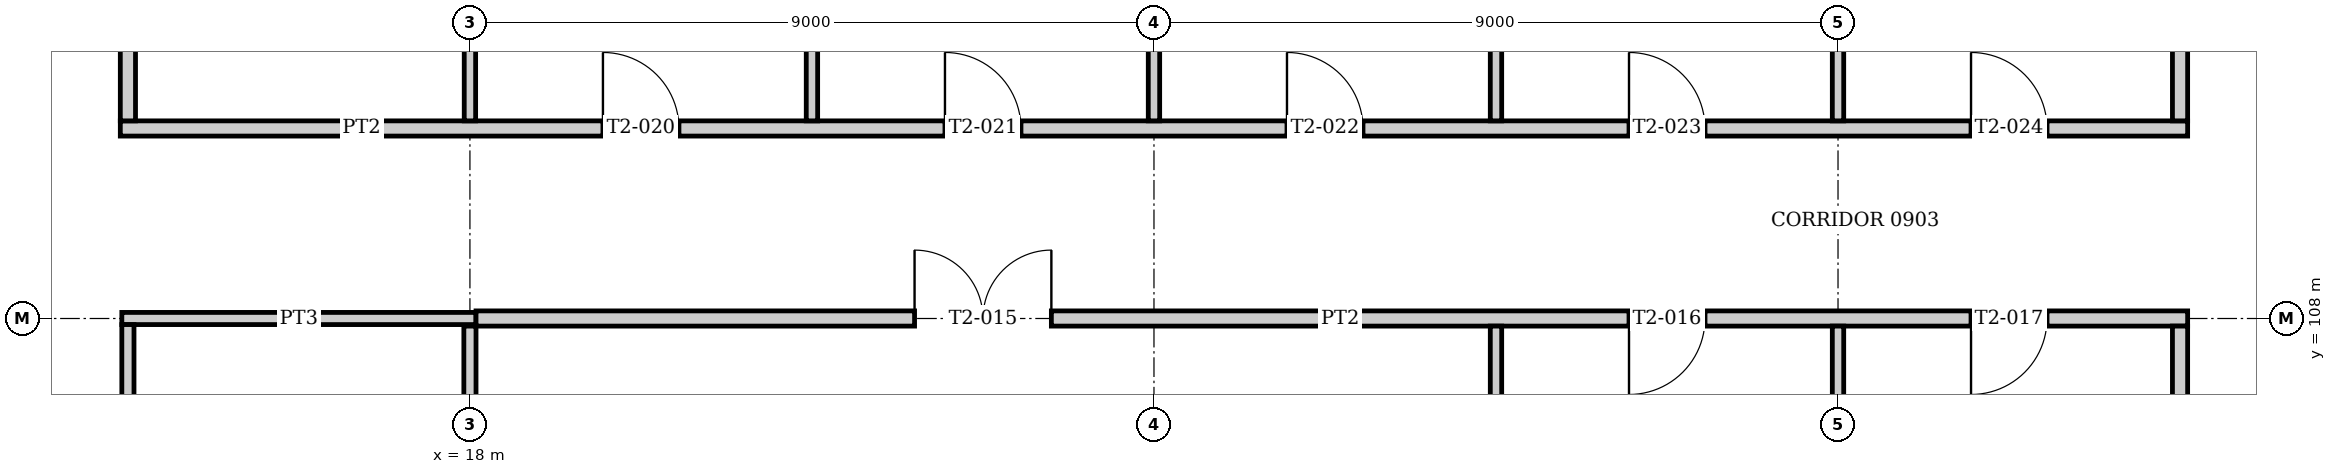
"""IFC4 building model, lengths in metres.
Left out: names, types, materials, properties, quantities, classifications, styles, units other than length and angle.
Written with IfcOpenShell. Run it as: python <this file> out.ifc"""

import sys

from ifc_helpers import new_model, si_unit, direction, frame, frame_2d, origin, place, context, subcontext, project, spatial, rectangle, extrude, element, fill, save


model = new_model("IFC4")
c1 = context("Model", 3, precision=1e-05, world=origin(), true_north=direction((0.0, 1.0)))
c2 = subcontext(c1, "Body", "Model", "MODEL_VIEW")
j1 = project(units=[si_unit("LENGTHUNIT", "METRE"), si_unit("PLANEANGLEUNIT", "RADIAN")], contexts=[c1])
p1 = place(None, origin())
s1 = spatial("IfcSite", under=j1, at=p1, CompositionType="ELEMENT")
p2 = place(p1, origin())
s2 = spatial("IfcBuilding", under=s1, at=p2, CompositionType="ELEMENT")
p3 = place(p2, frame((0.0, 0.0, 39.2)))
s3 = spatial("IfcBuildingStorey", under=s2, at=p3, CompositionType="ELEMENT", Elevation=39.2)
p4 = place(p3, frame((13.42, 108.0, 0.0), z_axis=(0.0, 0.0, 1.0), x_axis=(1.0, 0.0, 0.0)))
e1 = element("IfcWall", 1, at=p4, inside=s3, PredefinedType="PARTITIONING", context=c2, shape_type="SweptSolid", body=[
    extrude(rectangle(XDim=4.66, YDim=0.16, at=frame_2d((2.33, 0.0))), origin(), (0.0, 0.0, 1.0), 3.05),
])
p5 = place(p3, frame((18.08, 108.0, 0.0), z_axis=(0.0, 0.0, 1.0), x_axis=(1.0, 0.0, 0.0)))
e2 = element("IfcWall", 2, at=p5, inside=s3, PredefinedType="PARTITIONING", context=c2, shape_type="SweptSolid", body=[
    extrude(rectangle(XDim=22.52, YDim=0.2, at=frame_2d((11.26, 0.0))), origin(), (0.0, 0.0, 1.0), 3.05),
])
p6 = place(p5, frame((5.77, 0.0, 0.0)))
e3 = element("IfcOpeningElement", 3, at=p6, cuts=e2, PredefinedType="OPENING", context=c2, shape_type="SweptSolid", body=[
    extrude(rectangle(XDim=1.8, YDim=2.1, at=frame_2d((0.9, 1.05))), frame((0.0, 0.11, 0.0), z_axis=(0.0, -1.0, 0.0), x_axis=(1.0, 0.0, 0.0)), (0.0, 0.0, 1.0), 0.22),
])
p7 = place(p5, frame((15.17, 0.0, 0.0)))
e4 = element("IfcOpeningElement", 4, at=p7, cuts=e2, PredefinedType="OPENING", context=c2, shape_type="SweptSolid", body=[
    extrude(rectangle(XDim=1.0, YDim=2.1, at=frame_2d((0.5, 1.05))), frame((0.0, 0.11, 0.0), z_axis=(0.0, -1.0, 0.0), x_axis=(1.0, 0.0, 0.0)), (0.0, 0.0, 1.0), 0.22),
])
p8 = place(p5, frame((19.67, 0.0, 0.0)))
e5 = element("IfcOpeningElement", 5, at=p8, cuts=e2, PredefinedType="OPENING", context=c2, shape_type="SweptSolid", body=[
    extrude(rectangle(XDim=1.0, YDim=2.1, at=frame_2d((0.5, 1.05))), frame((0.0, 0.11, 0.0), z_axis=(0.0, -1.0, 0.0), x_axis=(1.0, 0.0, 0.0)), (0.0, 0.0, 1.0), 0.22),
])
p9 = place(p3, frame((13.4, 110.5, 0.0), z_axis=(0.0, 0.0, 1.0), x_axis=(1.0, 0.0, 0.0)))
e6 = element("IfcWall", 6, at=p9, inside=s3, PredefinedType="PARTITIONING", context=c2, shape_type="SweptSolid", body=[
    extrude(rectangle(XDim=27.2, YDim=0.2, at=frame_2d((13.6, 0.0))), origin(), (0.0, 0.0, 1.0), 3.05),
])
p10 = place(p9, frame((6.35, 0.0, 0.0)))
e7 = element("IfcOpeningElement", 7, at=p10, cuts=e6, PredefinedType="OPENING", context=c2, shape_type="SweptSolid", body=[
    extrude(rectangle(XDim=1.0, YDim=2.1, at=frame_2d((0.5, 1.05))), frame((0.0, 0.11, 0.0), z_axis=(0.0, -1.0, 0.0), x_axis=(1.0, 0.0, 0.0)), (0.0, 0.0, 1.0), 0.22),
])
p11 = place(p9, frame((10.85, 0.0, 0.0)))
e8 = element("IfcOpeningElement", 8, at=p11, cuts=e6, PredefinedType="OPENING", context=c2, shape_type="SweptSolid", body=[
    extrude(rectangle(XDim=1.0, YDim=2.1, at=frame_2d((0.5, 1.05))), frame((0.0, 0.11, 0.0), z_axis=(0.0, -1.0, 0.0), x_axis=(1.0, 0.0, 0.0)), (0.0, 0.0, 1.0), 0.22),
])
p12 = place(p9, frame((15.35, 0.0, 0.0)))
e9 = element("IfcOpeningElement", 9, at=p12, cuts=e6, PredefinedType="OPENING", context=c2, shape_type="SweptSolid", body=[
    extrude(rectangle(XDim=1.0, YDim=2.1, at=frame_2d((0.5, 1.05))), frame((0.0, 0.11, 0.0), z_axis=(0.0, -1.0, 0.0), x_axis=(1.0, 0.0, 0.0)), (0.0, 0.0, 1.0), 0.22),
])
p13 = place(p9, frame((19.85, 0.0, 0.0)))
e10 = element("IfcOpeningElement", 10, at=p13, cuts=e6, PredefinedType="OPENING", context=c2, shape_type="SweptSolid", body=[
    extrude(rectangle(XDim=1.0, YDim=2.1, at=frame_2d((0.5, 1.05))), frame((0.0, 0.11, 0.0), z_axis=(0.0, -1.0, 0.0), x_axis=(1.0, 0.0, 0.0)), (0.0, 0.0, 1.0), 0.22),
])
p14 = place(p9, frame((24.35, 0.0, 0.0)))
e11 = element("IfcOpeningElement", 11, at=p14, cuts=e6, PredefinedType="OPENING", context=c2, shape_type="SweptSolid", body=[
    extrude(rectangle(XDim=1.0, YDim=2.1, at=frame_2d((0.5, 1.05))), frame((0.0, 0.11, 0.0), z_axis=(0.0, -1.0, 0.0), x_axis=(1.0, 0.0, 0.0)), (0.0, 0.0, 1.0), 0.22),
])
p15 = place(p3, frame((13.5, 103.58, 0.0), z_axis=(0.0, 0.0, 1.0), x_axis=(0.0, 1.0, 0.0)))
e12 = element("IfcWall", 12, at=p15, inside=s3, PredefinedType="PARTITIONING", context=c2, shape_type="SweptSolid", body=[
    extrude(rectangle(XDim=4.34, YDim=0.16, at=frame_2d((2.17, 0.0))), origin(), (0.0, 0.0, 1.0), 3.05),
])
p16 = place(p15, frame((1.795, 0.0, 0.0)))
e13 = element("IfcOpeningElement", 13, at=p16, cuts=e12, PredefinedType="OPENING", context=c2, shape_type="SweptSolid", body=[
    extrude(rectangle(XDim=0.75, YDim=2.1, at=frame_2d((0.375, 1.05))), frame((0.0, 0.09, 0.0), z_axis=(0.0, -1.0, 0.0), x_axis=(1.0, 0.0, 0.0)), (0.0, 0.0, 1.0), 0.18),
])
p17 = place(p3, frame((13.5, 110.6, 0.0), z_axis=(0.0, 0.0, 1.0), x_axis=(0.0, 1.0, 0.0)))
e14 = element("IfcWall", 14, at=p17, inside=s3, PredefinedType="PARTITIONING", context=c2, shape_type="SweptSolid", body=[
    extrude(rectangle(XDim=6.31, YDim=0.2, at=frame_2d((3.155, 0.0))), origin(), (0.0, 0.0, 1.0), 3.05),
])
p18 = place(p17, frame((1.25, 0.0, 0.0)))
e15 = element("IfcOpeningElement", 15, at=p18, cuts=e14, PredefinedType="OPENING", context=c2, shape_type="SweptSolid", body=[
    extrude(rectangle(XDim=0.8, YDim=2.1, at=frame_2d((0.4, 1.05))), frame((0.0, 0.11, 0.0), z_axis=(0.0, -1.0, 0.0), x_axis=(1.0, 0.0, 0.0)), (0.0, 0.0, 1.0), 0.22),
])
p19 = place(p17, frame((4.44, 0.0, 0.0)))
e16 = element("IfcOpeningElement", 16, at=p19, cuts=e14, PredefinedType="OPENING", context=c2, shape_type="SweptSolid", body=[
    extrude(rectangle(XDim=0.92, YDim=2.1, at=frame_2d((0.46, 1.05))), frame((0.0, 0.11, 0.0), z_axis=(0.0, -1.0, 0.0), x_axis=(1.0, 0.0, 0.0)), (0.0, 0.0, 1.0), 0.22),
])
p20 = place(p3, frame((18.0, 103.58, 0.0), z_axis=(0.0, 0.0, 1.0), x_axis=(0.0, 1.0, 0.0)))
e17 = element("IfcWall", 17, at=p20, inside=s3, PredefinedType="PARTITIONING", context=c2, shape_type="SweptSolid", body=[
    extrude(rectangle(XDim=4.32, YDim=0.16, at=frame_2d((2.16, 0.0))), origin(), (0.0, 0.0, 1.0), 3.05),
])
p21 = place(p3, frame((18.0, 110.6, 0.0), z_axis=(0.0, 0.0, 1.0), x_axis=(0.0, 1.0, 0.0)))
e18 = element("IfcWall", 18, at=p21, inside=s3, PredefinedType="PARTITIONING", context=c2, shape_type="SweptSolid", body=[
    extrude(rectangle(XDim=6.6, YDim=0.15, at=frame_2d((3.3, 0.0))), origin(), (0.0, 0.0, 1.0), 3.05),
])
p22 = place(p3, frame((22.5, 110.6, 0.0), z_axis=(0.0, 0.0, 1.0), x_axis=(0.0, 1.0, 0.0)))
e19 = element("IfcWall", 19, at=p22, inside=s3, PredefinedType="PARTITIONING", context=c2, shape_type="SweptSolid", body=[
    extrude(rectangle(XDim=6.31, YDim=0.15, at=frame_2d((3.155, 0.0))), origin(), (0.0, 0.0, 1.0), 3.05),
])
p23 = place(p3, frame((27.0, 110.6, 0.0), z_axis=(0.0, 0.0, 1.0), x_axis=(0.0, 1.0, 0.0)))
e20 = element("IfcWall", 20, at=p23, inside=s3, PredefinedType="PARTITIONING", context=c2, shape_type="SweptSolid", body=[
    extrude(rectangle(XDim=6.6, YDim=0.15, at=frame_2d((3.3, 0.0))), origin(), (0.0, 0.0, 1.0), 3.05),
])
p24 = place(p3, frame((31.5, 99.075, 0.0), z_axis=(0.0, 0.0, 1.0), x_axis=(0.0, 1.0, 0.0)))
e21 = element("IfcWall", 21, at=p24, inside=s3, PredefinedType="PARTITIONING", context=c2, shape_type="SweptSolid", body=[
    extrude(rectangle(XDim=8.825, YDim=0.15, at=frame_2d((4.413, 0.0))), origin(), (0.0, 0.0, 1.0), 3.05),
])
p25 = place(p3, frame((31.5, 110.6, 0.0), z_axis=(0.0, 0.0, 1.0), x_axis=(0.0, 1.0, 0.0)))
e22 = element("IfcWall", 22, at=p25, inside=s3, PredefinedType="PARTITIONING", context=c2, shape_type="SweptSolid", body=[
    extrude(rectangle(XDim=6.31, YDim=0.15, at=frame_2d((3.155, 0.0))), origin(), (0.0, 0.0, 1.0), 3.05),
])
p26 = place(p3, frame((36.0, 99.207, 0.0), z_axis=(0.0, 0.0, 1.0), x_axis=(0.0, 1.0, 0.0)))
e23 = element("IfcWall", 23, at=p26, inside=s3, PredefinedType="PARTITIONING", context=c2, shape_type="SweptSolid", body=[
    extrude(rectangle(XDim=8.693, YDim=0.15, at=frame_2d((4.346, 0.0))), origin(), (0.0, 0.0, 1.0), 3.05),
])
p27 = place(p3, frame((36.0, 110.6, 0.0), z_axis=(0.0, 0.0, 1.0), x_axis=(0.0, 1.0, 0.0)))
e24 = element("IfcWall", 24, at=p27, inside=s3, PredefinedType="PARTITIONING", context=c2, shape_type="SweptSolid", body=[
    extrude(rectangle(XDim=6.6, YDim=0.15, at=frame_2d((3.3, 0.0))), origin(), (0.0, 0.0, 1.0), 3.05),
])
p28 = place(p3, frame((40.5, 99.075, 0.0), z_axis=(0.0, 0.0, 1.0), x_axis=(0.0, 1.0, 0.0)))
e25 = element("IfcWall", 25, at=p28, inside=s3, PredefinedType="PARTITIONING", context=c2, shape_type="SweptSolid", body=[
    extrude(rectangle(XDim=8.825, YDim=0.2, at=frame_2d((4.413, 0.0))), origin(), (0.0, 0.0, 1.0), 3.05),
])
p29 = place(p3, frame((40.5, 110.6, 0.0), z_axis=(0.0, 0.0, 1.0), x_axis=(0.0, 1.0, 0.0)))
e26 = element("IfcWall", 26, at=p29, inside=s3, PredefinedType="PARTITIONING", context=c2, shape_type="SweptSolid", body=[
    extrude(rectangle(XDim=6.31, YDim=0.2, at=frame_2d((3.155, 0.0))), origin(), (0.0, 0.0, 1.0), 3.05),
])
p30 = place(p6, origin())
e27 = element("IfcDoor", 27, at=p30, inside=s3, OperationType="DOUBLE_DOOR_SINGLE_SWING", PredefinedType="DOOR", context=c2, shape_type="SweptSolid", body=[
    extrude(rectangle(XDim=1.8, YDim=2.1, at=frame_2d((0.9, 1.05))), frame((0.0, 0.025, 0.0), z_axis=(0.0, -1.0, 0.0), x_axis=(1.0, 0.0, 0.0)), (0.0, 0.0, 1.0), 0.05),
])
fill(e3, e27)
p31 = place(p7, frame((1.0, 0.0, 0.0), z_axis=(0.0, 0.0, 1.0), x_axis=(-1.0, 0.0, 0.0)))
e28 = element("IfcDoor", 28, at=p31, inside=s3, OperationType="SINGLE_SWING_RIGHT", PredefinedType="DOOR", context=c2, shape_type="SweptSolid", body=[
    extrude(rectangle(XDim=1.0, YDim=2.1, at=frame_2d((0.5, 1.05))), frame((0.0, 0.025, 0.0), z_axis=(0.0, -1.0, 0.0), x_axis=(1.0, 0.0, 0.0)), (0.0, 0.0, 1.0), 0.05),
])
fill(e4, e28)
p32 = place(p8, frame((1.0, 0.0, 0.0), z_axis=(0.0, 0.0, 1.0), x_axis=(-1.0, 0.0, 0.0)))
e29 = element("IfcDoor", 29, at=p32, inside=s3, OperationType="SINGLE_SWING_RIGHT", PredefinedType="DOOR", context=c2, shape_type="SweptSolid", body=[
    extrude(rectangle(XDim=1.0, YDim=2.1, at=frame_2d((0.5, 1.05))), frame((0.0, 0.025, 0.0), z_axis=(0.0, -1.0, 0.0), x_axis=(1.0, 0.0, 0.0)), (0.0, 0.0, 1.0), 0.05),
])
fill(e5, e29)
p33 = place(p10, origin())
e30 = element("IfcDoor", 30, at=p33, inside=s3, OperationType="SINGLE_SWING_LEFT", PredefinedType="DOOR", context=c2, shape_type="SweptSolid", body=[
    extrude(rectangle(XDim=1.0, YDim=2.1, at=frame_2d((0.5, 1.05))), frame((0.0, 0.025, 0.0), z_axis=(0.0, -1.0, 0.0), x_axis=(1.0, 0.0, 0.0)), (0.0, 0.0, 1.0), 0.05),
])
fill(e7, e30)
p34 = place(p11, origin())
e31 = element("IfcDoor", 31, at=p34, inside=s3, OperationType="SINGLE_SWING_LEFT", PredefinedType="DOOR", context=c2, shape_type="SweptSolid", body=[
    extrude(rectangle(XDim=1.0, YDim=2.1, at=frame_2d((0.5, 1.05))), frame((0.0, 0.025, 0.0), z_axis=(0.0, -1.0, 0.0), x_axis=(1.0, 0.0, 0.0)), (0.0, 0.0, 1.0), 0.05),
])
fill(e8, e31)
p35 = place(p12, origin())
e32 = element("IfcDoor", 32, at=p35, inside=s3, OperationType="SINGLE_SWING_LEFT", PredefinedType="DOOR", context=c2, shape_type="SweptSolid", body=[
    extrude(rectangle(XDim=1.0, YDim=2.1, at=frame_2d((0.5, 1.05))), frame((0.0, 0.025, 0.0), z_axis=(0.0, -1.0, 0.0), x_axis=(1.0, 0.0, 0.0)), (0.0, 0.0, 1.0), 0.05),
])
fill(e9, e32)
p36 = place(p13, origin())
e33 = element("IfcDoor", 33, at=p36, inside=s3, OperationType="SINGLE_SWING_LEFT", PredefinedType="DOOR", context=c2, shape_type="SweptSolid", body=[
    extrude(rectangle(XDim=1.0, YDim=2.1, at=frame_2d((0.5, 1.05))), frame((0.0, 0.025, 0.0), z_axis=(0.0, -1.0, 0.0), x_axis=(1.0, 0.0, 0.0)), (0.0, 0.0, 1.0), 0.05),
])
fill(e10, e33)
p37 = place(p14, origin())
e34 = element("IfcDoor", 34, at=p37, inside=s3, OperationType="SINGLE_SWING_LEFT", PredefinedType="DOOR", context=c2, shape_type="SweptSolid", body=[
    extrude(rectangle(XDim=1.0, YDim=2.1, at=frame_2d((0.5, 1.05))), frame((0.0, 0.025, 0.0), z_axis=(0.0, -1.0, 0.0), x_axis=(1.0, 0.0, 0.0)), (0.0, 0.0, 1.0), 0.05),
])
fill(e11, e34)
save(model, sys.argv[1])
